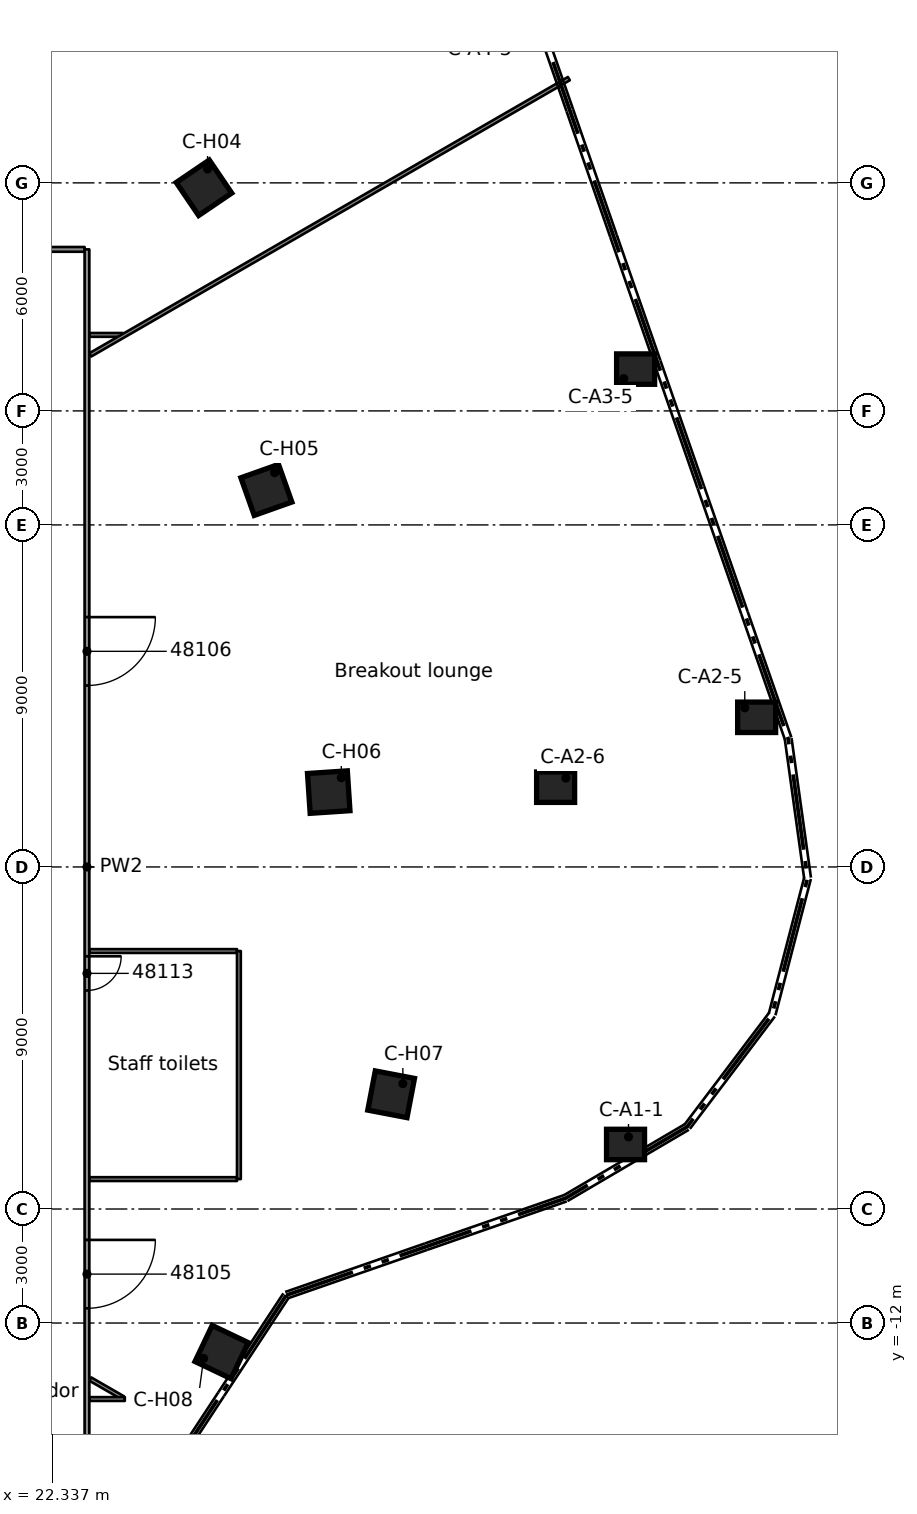
"""IFC4 building model, lengths in metres.
Left out: names, types, materials, properties, quantities, classifications, styles, units other than length and angle.
Written with IfcOpenShell. Run it as: python <this file> out.ifc"""

import sys

from ifc_helpers import new_model, si_unit, direction, frame, frame_2d, origin, origin_2d, place, context, subcontext, project, spatial, rectangle, extrude, element, fill, save


model = new_model("IFC4")
c1 = context("Model", 3, precision=1e-05, world=origin(), true_north=direction((0.0, 1.0)))
c2 = subcontext(c1, "Body", "Model", "MODEL_VIEW")
j1 = project(units=[si_unit("LENGTHUNIT", "METRE"), si_unit("PLANEANGLEUNIT", "RADIAN")], contexts=[c1])
p1 = place(None, origin())
s1 = spatial("IfcSite", under=j1, at=p1, CompositionType="ELEMENT")
p2 = place(p1, origin())
s2 = spatial("IfcBuilding", under=s1, at=p2, CompositionType="ELEMENT")
p3 = place(p2, frame((0.0, 0.0, 235.5)))
s3 = spatial("IfcBuildingStorey", under=s2, at=p3, CompositionType="ELEMENT", Elevation=235.5)
for number, where, z_axis, x_axis in (
    (1, (37.423, -7.302, 0.0), (0.0, 0.0, 1.0), (1.0, 0.0, 0.0)),
    (2, (40.873, 3.938, 0.0), (0.0, 0.0, 1.0), (1.0, 0.0, 0.0)),
    (3, (35.583, 2.099, 0.0), (0.0, 0.0, 1.0), (1.0, 0.0, 0.0)),
    (4, (37.688, 13.1, 0.0), (0.0, 0.0, 1.0), (1.0, 0.0, 0.0)),
):
    element("IfcColumn", number, at=place(p3, frame(where, z_axis=z_axis, x_axis=x_axis)), inside=s3, PredefinedType="COLUMN", context=c2, shape_type="SweptSolid", body=[
        extrude(rectangle(XDim=1.0, YDim=0.8, at=origin_2d()), origin(), (0.0, 0.0, 1.0), 3.5),
    ])
for number, where, z_axis, x_axis in (
    (5, (26.33, 17.871, 0.0), (0.0, 0.0, 1.0), (0.827, 0.562, 0.0)),
    (6, (27.972, 9.921, 0.0), (0.0, 0.0, 1.0), (0.942, 0.334, 0.0)),
    (7, (29.613, 1.97, 0.0), (0.0, 0.0, 1.0), (0.998, 0.066, 0.0)),
    (8, (31.255, -5.981, 0.0), (0.0, 0.0, 1.0), (0.982, -0.188, 0.0)),
    (9, (26.794, -12.764, 0.0), (0.0, 0.0, 1.0), (0.903, -0.43, 0.0)),
):
    element("IfcColumn", number, at=place(p3, frame(where, z_axis=z_axis, x_axis=x_axis)), inside=s3, PredefinedType="COLUMN", context=c2, shape_type="SweptSolid", body=[
        extrude(rectangle(XDim=1.05, YDim=1.05, at=origin_2d()), origin(), (0.0, 0.0, 1.0), 3.5),
    ])
p4 = place(p3, frame((23.338, -13.474, 0.0), z_axis=(0.0, 0.0, 1.0), x_axis=(0.866295472041, -0.499531936037, 0.0)))
e10 = element("IfcWall", 10, at=p4, inside=s3, PredefinedType="PARTITIONING", context=c2, shape_type="SweptSolid", body=[
    extrude(rectangle(XDim=0.999, YDim=0.1, at=frame_2d((0.499, 0.0))), origin(), (0.0, 0.0, 1.0), 3.08),
])
p5 = place(p3, frame((23.314, -14.0, 0.0), z_axis=(0.0, 0.0, 1.0), x_axis=(1.0, 0.0, 0.0)))
e11 = element("IfcWall", 11, at=p5, inside=s3, PredefinedType="PARTITIONING", context=c2, shape_type="SweptSolid", body=[
    extrude(rectangle(XDim=0.933, YDim=0.1, at=frame_2d((0.467, 0.0))), origin(), (0.0, 0.0, 1.0), 3.08),
])
for number, where, z_axis, x_axis in (
    (12, (23.314, -8.213, 0.0), (0.0, 0.0, 1.0), (1.0, 0.0, 0.0)),
    (13, (23.314, -2.212, 0.0), (0.0, 0.0, 1.0), (1.0, 0.0, 0.0)),
):
    element("IfcWall", number, at=place(p3, frame(where, z_axis=z_axis, x_axis=x_axis)), inside=s3, PredefinedType="PARTITIONING", context=c2, shape_type="SweptSolid", body=[
        extrude(rectangle(XDim=3.885, YDim=0.1, at=frame_2d((1.942, 0.0))), origin(), (0.0, 0.0, 1.0), 3.08),
    ])
p6 = place(p3, frame((23.314, 14.0, 0.0), z_axis=(0.0, 0.0, 1.0), x_axis=(1.0, 0.0, 0.0)))
e14 = element("IfcWall", 14, at=p6, inside=s3, PredefinedType="PARTITIONING", context=c2, shape_type="SweptSolid", body=[
    extrude(rectangle(XDim=0.885, YDim=0.1, at=frame_2d((0.442, 0.0))), origin(), (0.0, 0.0, 1.0), 3.08),
])
p7 = place(p3, frame((12.91, 16.25, 0.0), z_axis=(0.0, 0.0, 1.0), x_axis=(1.0, 0.0, 0.0)))
e15 = element("IfcWall", 15, at=p7, inside=s3, PredefinedType="PARTITIONING", context=c2, shape_type="SweptSolid", body=[
    extrude(rectangle(XDim=10.279, YDim=0.125, at=frame_2d((5.14, 0.0))), origin(), (0.0, 0.0, 1.0), 3.08),
])
p8 = place(p7, frame((7.19, 0.0, 0.0)))
e16 = element("IfcOpeningElement", 16, at=p8, cuts=e15, PredefinedType="OPENING", context=c2, shape_type="SweptSolid", body=[
    extrude(rectangle(XDim=0.9, YDim=2.1, at=frame_2d((0.45, 1.05))), frame((0.0, 0.073, 0.0), z_axis=(0.0, -1.0, 0.0), x_axis=(1.0, 0.0, 0.0)), (0.0, 0.0, 1.0), 0.145),
])
p9 = place(p3, frame((23.338, 13.474, 0.0), z_axis=(0.0, 0.0, 1.0), x_axis=(0.866095287821, 0.499878937759, 0.0)))
e17 = element("IfcWall", 17, at=p9, inside=s3, PredefinedType="PARTITIONING", context=c2, shape_type="SweptSolid", body=[
    extrude(rectangle(XDim=14.541, YDim=0.1, at=frame_2d((7.271, 0.0))), origin(), (0.0, 0.0, 1.0), 3.08),
])
p10 = place(p3, frame((27.249, -8.213, 0.0), z_axis=(0.0, 0.0, 1.0), x_axis=(0.0, 1.0, 0.0)))
e18 = element("IfcWall", 18, at=p10, inside=s3, PredefinedType="PARTITIONING", context=c2, shape_type="SweptSolid", body=[
    extrude(rectangle(XDim=6.001, YDim=0.1, at=frame_2d((3.0, 0.0))), origin(), (0.0, 0.0, 1.0), 3.08),
])
p11 = place(p3, frame((23.251, 16.25, 0.0), z_axis=(0.0, 0.0, 1.0), x_axis=(0.0, -1.0, 0.0)))
e19 = element("IfcWall", 19, at=p11, inside=s3, PredefinedType="PARTITIONING", context=c2, shape_type="SweptSolid", body=[
    extrude(rectangle(XDim=32.5, YDim=0.125, at=frame_2d((16.25, 0.0))), origin(), (0.0, 0.0, 1.0), 3.08),
])
p12 = place(p11, frame((26.063, 0.0, 0.0)))
e20 = element("IfcOpeningElement", 20, at=p12, cuts=e19, PredefinedType="OPENING", context=c2, shape_type="SweptSolid", body=[
    extrude(rectangle(XDim=1.8, YDim=2.1, at=frame_2d((0.9, 1.05))), frame((0.0, 0.073, 0.0), z_axis=(0.0, -1.0, 0.0), x_axis=(1.0, 0.0, 0.0)), (0.0, 0.0, 1.0), 0.145),
])
p13 = place(p11, frame((9.676, 0.0, 0.0)))
e21 = element("IfcOpeningElement", 21, at=p13, cuts=e19, PredefinedType="OPENING", context=c2, shape_type="SweptSolid", body=[
    extrude(rectangle(XDim=1.8, YDim=2.1, at=frame_2d((0.9, 1.05))), frame((0.0, 0.073, 0.0), z_axis=(0.0, -1.0, 0.0), x_axis=(1.0, 0.0, 0.0)), (0.0, 0.0, 1.0), 0.145),
])
p14 = place(p11, frame((18.6, 0.0, 0.0)))
e22 = element("IfcOpeningElement", 22, at=p14, cuts=e19, PredefinedType="OPENING", context=c2, shape_type="SweptSolid", body=[
    extrude(rectangle(XDim=0.9, YDim=2.1, at=frame_2d((0.45, 1.05))), frame((0.0, 0.073, 0.0), z_axis=(0.0, -1.0, 0.0), x_axis=(1.0, 0.0, 0.0)), (0.0, 0.0, 1.0), 0.145),
])
p15 = place(p12, origin())
e23 = element("IfcDoor", 23, at=p15, inside=s3, OperationType="DOUBLE_DOOR_SINGLE_SWING", PredefinedType="DOOR", context=c2, shape_type="SweptSolid", body=[
    extrude(rectangle(XDim=1.8, YDim=2.1, at=frame_2d((0.9, 1.05))), frame((0.0, 0.025, 0.0), z_axis=(0.0, -1.0, 0.0), x_axis=(1.0, 0.0, 0.0)), (0.0, 0.0, 1.0), 0.05),
])
fill(e20, e23)
p16 = place(p13, origin())
e24 = element("IfcDoor", 24, at=p16, inside=s3, OperationType="DOUBLE_DOOR_SINGLE_SWING", PredefinedType="DOOR", context=c2, shape_type="SweptSolid", body=[
    extrude(rectangle(XDim=1.8, YDim=2.1, at=frame_2d((0.9, 1.05))), frame((0.0, 0.025, 0.0), z_axis=(0.0, -1.0, 0.0), x_axis=(1.0, 0.0, 0.0)), (0.0, 0.0, 1.0), 0.05),
])
fill(e21, e24)
p17 = place(p14, origin())
e25 = element("IfcDoor", 25, at=p17, inside=s3, OperationType="SINGLE_SWING_RIGHT", PredefinedType="DOOR", context=c2, shape_type="SweptSolid", body=[
    extrude(rectangle(XDim=0.9, YDim=2.1, at=frame_2d((0.45, 1.05))), frame((0.0, 0.025, 0.0), z_axis=(0.0, -1.0, 0.0), x_axis=(1.0, 0.0, 0.0)), (0.0, 0.0, 1.0), 0.05),
])
fill(e22, e25)
save(model, sys.argv[1])
